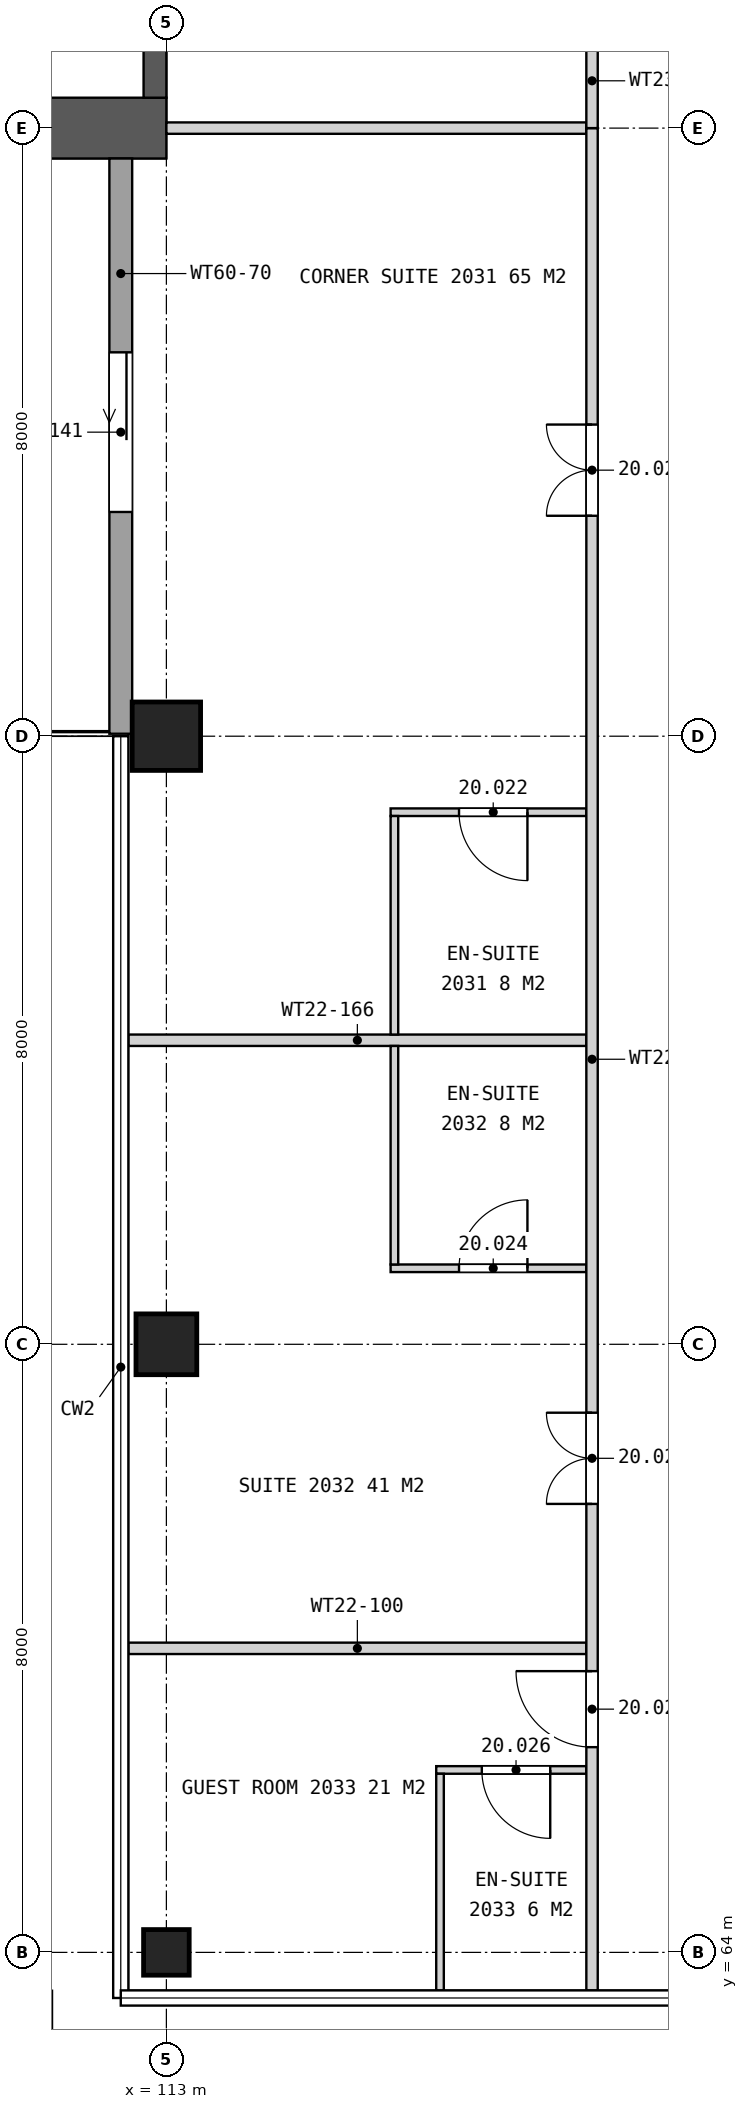
"""IFC4 building model, lengths in metres.
Left out: names, types, materials, properties, quantities, classifications, styles, units other than length and angle.
Written with IfcOpenShell. Run it as: python <this file> out.ifc"""

import sys

from ifc_helpers import new_model, si_unit, direction, frame, frame_2d, origin, origin_2d, place, context, subcontext, project, spatial, rectangle, extrude, element, fill, save


model = new_model("IFC4")
c1 = context("Model", 3, precision=1e-05, world=origin(), true_north=direction((0.0, 1.0)))
c2 = subcontext(c1, "Body", "Model", "MODEL_VIEW")
j1 = project(units=[si_unit("LENGTHUNIT", "METRE"), si_unit("PLANEANGLEUNIT", "RADIAN")], contexts=[c1])
p1 = place(None, origin())
s1 = spatial("IfcSite", under=j1, at=p1, CompositionType="ELEMENT")
p2 = place(p1, origin())
s2 = spatial("IfcBuilding", under=s1, at=p2, CompositionType="ELEMENT")
p3 = place(p2, frame((0.0, 0.0, 101.6)))
s3 = spatial("IfcBuildingStorey", under=s2, at=p3, CompositionType="ELEMENT", Elevation=101.6)
p4 = place(p3, frame((113.0, 64.0, 0.0), z_axis=(0.0, 0.0, 1.0), x_axis=(1.0, 0.0, 0.0)))
e1 = element("IfcColumn", 1, at=p4, inside=s3, PredefinedType="COLUMN", context=c2, shape_type="SweptSolid", body=[
    extrude(rectangle(XDim=0.6, YDim=0.6, at=origin_2d()), origin(), (0.0, 0.0, 1.0), 3.7),
])
p5 = place(p3, frame((113.0, 72.0, 0.0), z_axis=(0.0, 0.0, 1.0), x_axis=(1.0, 0.0, 0.0)))
e2 = element("IfcColumn", 2, at=p5, inside=s3, PredefinedType="COLUMN", context=c2, shape_type="SweptSolid", body=[
    extrude(rectangle(XDim=0.8, YDim=0.8, at=origin_2d()), origin(), (0.0, 0.0, 1.0), 3.7),
])
p6 = place(p3, frame((113.0, 80.0, 0.0), z_axis=(0.0, 0.0, 1.0), x_axis=(1.0, 0.0, 0.0)))
e3 = element("IfcColumn", 3, at=p6, inside=s3, PredefinedType="COLUMN", context=c2, shape_type="SweptSolid", body=[
    extrude(rectangle(XDim=0.9, YDim=0.9, at=origin_2d()), origin(), (0.0, 0.0, 1.0), 3.7),
])
p7 = place(p3, frame((113.0, 88.0, 0.0), z_axis=(0.0, 0.0, 1.0), x_axis=(-1.0, 0.0, 0.0)))
e4 = element("IfcWall", 4, at=p7, inside=s3, PredefinedType="SHEAR", context=c2, shape_type="SweptSolid", body=[
    extrude(rectangle(XDim=7.1, YDim=0.8, at=frame_2d((3.55, 0.0))), origin(), (0.0, 0.0, 1.0), 3.7),
])
p8 = place(p3, frame((112.85, 94.3, 0.0), z_axis=(0.0, 0.0, 1.0), x_axis=(0.0, -1.0, 0.0)))
e5 = element("IfcWall", 5, at=p8, inside=s3, PredefinedType="SHEAR", context=c2, shape_type="SweptSolid", body=[
    extrude(rectangle(XDim=5.9, YDim=0.3, at=frame_2d((2.95, 0.0))), origin(), (0.0, 0.0, 1.0), 3.7),
])
p9 = place(p3, frame((112.4, 87.6, 0.0), z_axis=(0.0, 0.0, 1.0), x_axis=(0.0, -1.0, 0.0)))
e6 = element("IfcWall", 6, at=p9, inside=s3, PredefinedType="SOLIDWALL", context=c2, shape_type="SweptSolid", body=[
    extrude(rectangle(XDim=7.568, YDim=0.3, at=frame_2d((3.784, 0.0))), origin(), (0.0, 0.0, 1.0), 3.3),
])
p10 = place(p9, frame((2.55, 0.0, 0.0)))
e7 = element("IfcOpeningElement", 7, at=p10, cuts=e6, PredefinedType="OPENING", context=c2, shape_type="SweptSolid", body=[
    extrude(rectangle(XDim=2.1, YDim=2.4, at=frame_2d((1.05, 1.2))), frame((0.0, 0.16, 0.0), z_axis=(0.0, -1.0, 0.0), x_axis=(1.0, 0.0, 0.0)), (0.0, 0.0, 1.0), 0.32),
])
p11 = place(p3, frame((116.55, 66.4, 0.0), z_axis=(0.0, 0.0, 1.0), x_axis=(1.0, 0.0, 0.0)))
e8 = element("IfcWall", 8, at=p11, inside=s3, PredefinedType="PLUMBINGWALL", context=c2, shape_type="SweptSolid", body=[
    extrude(rectangle(XDim=1.975, YDim=0.1, at=frame_2d((0.987, 0.0))), origin(), (0.0, 0.0, 1.0), 3.7),
])
p12 = place(p11, frame((0.6, 0.0, 0.0)))
e9 = element("IfcOpeningElement", 9, at=p12, cuts=e8, PredefinedType="OPENING", context=c2, shape_type="SweptSolid", body=[
    extrude(rectangle(XDim=0.9, YDim=2.1, at=frame_2d((0.45, 1.05))), frame((0.0, 0.06, 0.0), z_axis=(0.0, -1.0, 0.0), x_axis=(1.0, 0.0, 0.0)), (0.0, 0.0, 1.0), 0.12),
])
p13 = place(p3, frame((112.5, 68.0, 0.0), z_axis=(0.0, 0.0, 1.0), x_axis=(1.0, 0.0, 0.0)))
e10 = element("IfcWall", 10, at=p13, inside=s3, PredefinedType="PARTITIONING", context=c2, shape_type="SweptSolid", body=[
    extrude(rectangle(XDim=6.025, YDim=0.15, at=frame_2d((3.012, 0.0))), origin(), (0.0, 0.0, 1.0), 2.843),
])
p14 = place(p3, frame((115.95, 73.0, 0.0), z_axis=(0.0, 0.0, 1.0), x_axis=(1.0, 0.0, 0.0)))
e11 = element("IfcWall", 11, at=p14, inside=s3, PredefinedType="PLUMBINGWALL", context=c2, shape_type="SweptSolid", body=[
    extrude(rectangle(XDim=2.575, YDim=0.1, at=frame_2d((1.288, 0.0))), origin(), (0.0, 0.0, 1.0), 3.7),
])
p15 = place(p14, frame((0.9, 0.0, 0.0)))
e12 = element("IfcOpeningElement", 12, at=p15, cuts=e11, PredefinedType="OPENING", context=c2, shape_type="SweptSolid", body=[
    extrude(rectangle(XDim=0.9, YDim=2.1, at=frame_2d((0.45, 1.05))), frame((0.0, 0.06, 0.0), z_axis=(0.0, -1.0, 0.0), x_axis=(1.0, 0.0, 0.0)), (0.0, 0.0, 1.0), 0.12),
])
p16 = place(p3, frame((112.5, 76.0, 0.0), z_axis=(0.0, 0.0, 1.0), x_axis=(1.0, 0.0, 0.0)))
e13 = element("IfcWall", 13, at=p16, inside=s3, PredefinedType="PARTITIONING", context=c2, shape_type="SweptSolid", body=[
    extrude(rectangle(XDim=6.025, YDim=0.15, at=frame_2d((3.012, 0.0))), origin(), (0.0, 0.0, 1.0), 2.843),
])
p17 = place(p3, frame((115.95, 79.0, 0.0), z_axis=(0.0, 0.0, 1.0), x_axis=(1.0, 0.0, 0.0)))
e14 = element("IfcWall", 14, at=p17, inside=s3, PredefinedType="PLUMBINGWALL", context=c2, shape_type="SweptSolid", body=[
    extrude(rectangle(XDim=2.575, YDim=0.1, at=frame_2d((1.288, 0.0))), origin(), (0.0, 0.0, 1.0), 3.7),
])
p18 = place(p17, frame((0.9, 0.0, 0.0)))
e15 = element("IfcOpeningElement", 15, at=p18, cuts=e14, PredefinedType="OPENING", context=c2, shape_type="SweptSolid", body=[
    extrude(rectangle(XDim=0.9, YDim=2.1, at=frame_2d((0.45, 1.05))), frame((0.0, 0.06, 0.0), z_axis=(0.0, -1.0, 0.0), x_axis=(1.0, 0.0, 0.0)), (0.0, 0.0, 1.0), 0.12),
])
p19 = place(p3, frame((113.0, 88.0, 0.0), z_axis=(0.0, 0.0, 1.0), x_axis=(1.0, 0.0, 0.0)))
e16 = element("IfcWall", 16, at=p19, inside=s3, PredefinedType="PARTITIONING", context=c2, shape_type="SweptSolid", body=[
    extrude(rectangle(XDim=5.525, YDim=0.15, at=frame_2d((2.762, 0.0))), origin(), (0.0, 0.0, 1.0), 3.7),
])
for number, where, z_axis, x_axis in (
    (17, (116.0, 73.05, 0.0), (0.0, 0.0, 1.0), (0.0, 1.0, 0.0)),
    (18, (116.0, 76.075, 0.0), (0.0, 0.0, 1.0), (0.0, 1.0, 0.0)),
):
    element("IfcWall", number, at=place(p3, frame(where, z_axis=z_axis, x_axis=x_axis)), inside=s3, PredefinedType="PLUMBINGWALL", context=c2, shape_type="SweptSolid", body=[
        extrude(rectangle(XDim=2.875, YDim=0.1, at=frame_2d((1.438, 0.0))), origin(), (0.0, 0.0, 1.0), 3.7),
    ])
p20 = place(p3, frame((116.6, 63.5, 0.0), z_axis=(0.0, 0.0, 1.0), x_axis=(0.0, 1.0, 0.0)))
e19 = element("IfcWall", 19, at=p20, inside=s3, PredefinedType="PLUMBINGWALL", context=c2, shape_type="SweptSolid", body=[
    extrude(rectangle(XDim=2.85, YDim=0.1, at=frame_2d((1.425, 0.0))), origin(), (0.0, 0.0, 1.0), 3.7),
])
p21 = place(p3, frame((118.6, 63.5, 0.0), z_axis=(0.0, 0.0, 1.0), x_axis=(0.0, 1.0, 0.0)))
e20 = element("IfcWall", 20, at=p21, inside=s3, PredefinedType="PARTITIONING", context=c2, shape_type="SweptSolid", body=[
    extrude(rectangle(XDim=24.5, YDim=0.15, at=frame_2d((12.25, 0.0))), origin(), (0.0, 0.0, 1.0), 2.76),
])
p22 = place(p21, frame((19.4, 0.0, 0.0)))
e21 = element("IfcOpeningElement", 21, at=p22, cuts=e20, PredefinedType="OPENING", context=c2, shape_type="SweptSolid", body=[
    extrude(rectangle(XDim=1.2, YDim=2.2, at=frame_2d((0.6, 1.1))), frame((0.0, 0.085, 0.0), z_axis=(0.0, -1.0, 0.0), x_axis=(1.0, 0.0, 0.0)), (0.0, 0.0, 1.0), 0.17),
])
p23 = place(p21, frame((6.4, 0.0, 0.0)))
e22 = element("IfcOpeningElement", 22, at=p23, cuts=e20, PredefinedType="OPENING", context=c2, shape_type="SweptSolid", body=[
    extrude(rectangle(XDim=1.2, YDim=2.2, at=frame_2d((0.6, 1.1))), frame((0.0, 0.085, 0.0), z_axis=(0.0, -1.0, 0.0), x_axis=(1.0, 0.0, 0.0)), (0.0, 0.0, 1.0), 0.17),
])
p24 = place(p21, frame((3.2, 0.0, 0.0)))
e23 = element("IfcOpeningElement", 23, at=p24, cuts=e20, PredefinedType="OPENING", context=c2, shape_type="SweptSolid", body=[
    extrude(rectangle(XDim=1.0, YDim=2.1, at=frame_2d((0.5, 1.05))), frame((0.0, 0.085, 0.0), z_axis=(0.0, -1.0, 0.0), x_axis=(1.0, 0.0, 0.0)), (0.0, 0.0, 1.0), 0.17),
])
p25 = place(p3, frame((118.6, 88.0, 0.0), z_axis=(0.0, 0.0, 1.0), x_axis=(0.0, 1.0, 0.0)))
e24 = element("IfcWall", 24, at=p25, inside=s3, PredefinedType="PARTITIONING", context=c2, shape_type="SweptSolid", body=[
    extrude(rectangle(XDim=6.225, YDim=0.15, at=frame_2d((3.113, 0.0))), origin(), (0.0, 0.0, 1.0), 2.843),
])
p26 = place(p25, frame((2.65, 0.0, 0.0)))
e25 = element("IfcOpeningElement", 25, at=p26, cuts=e24, PredefinedType="OPENING", context=c2, shape_type="SweptSolid", body=[
    extrude(rectangle(XDim=1.0, YDim=2.1, at=frame_2d((0.5, 1.05))), frame((0.0, 0.085, 0.0), z_axis=(0.0, -1.0, 0.0), x_axis=(1.0, 0.0, 0.0)), (0.0, 0.0, 1.0), 0.17),
])
p27 = place(p10, frame((2.1, 0.0, 0.0), z_axis=(0.0, 0.0, 1.0), x_axis=(-1.0, 0.0, 0.0)))
e26 = element("IfcDoor", 26, at=p27, inside=s3, OperationType="SLIDING_TO_LEFT", PredefinedType="DOOR", context=c2, shape_type="SweptSolid", body=[
    extrude(rectangle(XDim=2.1, YDim=2.4, at=frame_2d((1.05, 1.2))), frame((0.0, 0.025, 0.0), z_axis=(0.0, -1.0, 0.0), x_axis=(1.0, 0.0, 0.0)), (0.0, 0.0, 1.0), 0.05),
])
fill(e7, e26)
p28 = place(p22, origin())
e27 = element("IfcDoor", 27, at=p28, inside=s3, OperationType="DOUBLE_DOOR_SINGLE_SWING", PredefinedType="DOOR", context=c2, shape_type="SweptSolid", body=[
    extrude(rectangle(XDim=1.2, YDim=2.2, at=frame_2d((0.6, 1.1))), frame((0.0, 0.025, 0.0), z_axis=(0.0, -1.0, 0.0), x_axis=(1.0, 0.0, 0.0)), (0.0, 0.0, 1.0), 0.05),
])
fill(e21, e27)
p29 = place(p18, frame((0.9, 0.0, 0.0), z_axis=(0.0, 0.0, 1.0), x_axis=(-1.0, 0.0, 0.0)))
e28 = element("IfcDoor", 28, at=p29, inside=s3, OperationType="SINGLE_SWING_LEFT", PredefinedType="DOOR", context=c2, shape_type="SweptSolid", body=[
    extrude(rectangle(XDim=0.9, YDim=2.1, at=frame_2d((0.45, 1.05))), frame((0.0, 0.025, 0.0), z_axis=(0.0, -1.0, 0.0), x_axis=(1.0, 0.0, 0.0)), (0.0, 0.0, 1.0), 0.05),
])
fill(e15, e28)
p30 = place(p23, origin())
e29 = element("IfcDoor", 29, at=p30, inside=s3, OperationType="DOUBLE_DOOR_SINGLE_SWING", PredefinedType="DOOR", context=c2, shape_type="SweptSolid", body=[
    extrude(rectangle(XDim=1.2, YDim=2.2, at=frame_2d((0.6, 1.1))), frame((0.0, 0.025, 0.0), z_axis=(0.0, -1.0, 0.0), x_axis=(1.0, 0.0, 0.0)), (0.0, 0.0, 1.0), 0.05),
])
fill(e22, e29)
p31 = place(p15, origin())
e30 = element("IfcDoor", 30, at=p31, inside=s3, OperationType="SINGLE_SWING_RIGHT", PredefinedType="DOOR", context=c2, shape_type="SweptSolid", body=[
    extrude(rectangle(XDim=0.9, YDim=2.1, at=frame_2d((0.45, 1.05))), frame((0.0, 0.025, 0.0), z_axis=(0.0, -1.0, 0.0), x_axis=(1.0, 0.0, 0.0)), (0.0, 0.0, 1.0), 0.05),
])
fill(e12, e30)
p32 = place(p24, origin())
e31 = element("IfcDoor", 31, at=p32, inside=s3, OperationType="SINGLE_SWING_RIGHT", PredefinedType="DOOR", context=c2, shape_type="SweptSolid", body=[
    extrude(rectangle(XDim=1.0, YDim=2.1, at=frame_2d((0.5, 1.05))), frame((0.0, 0.025, 0.0), z_axis=(0.0, -1.0, 0.0), x_axis=(1.0, 0.0, 0.0)), (0.0, 0.0, 1.0), 0.05),
])
fill(e23, e31)
p33 = place(p12, frame((0.9, 0.0, 0.0), z_axis=(0.0, 0.0, 1.0), x_axis=(-1.0, 0.0, 0.0)))
e32 = element("IfcDoor", 32, at=p33, inside=s3, OperationType="SINGLE_SWING_LEFT", PredefinedType="DOOR", context=c2, shape_type="SweptSolid", body=[
    extrude(rectangle(XDim=0.9, YDim=2.1, at=frame_2d((0.45, 1.05))), frame((0.0, 0.025, 0.0), z_axis=(0.0, -1.0, 0.0), x_axis=(1.0, 0.0, 0.0)), (0.0, 0.0, 1.0), 0.05),
])
fill(e9, e32)
save(model, sys.argv[1])
